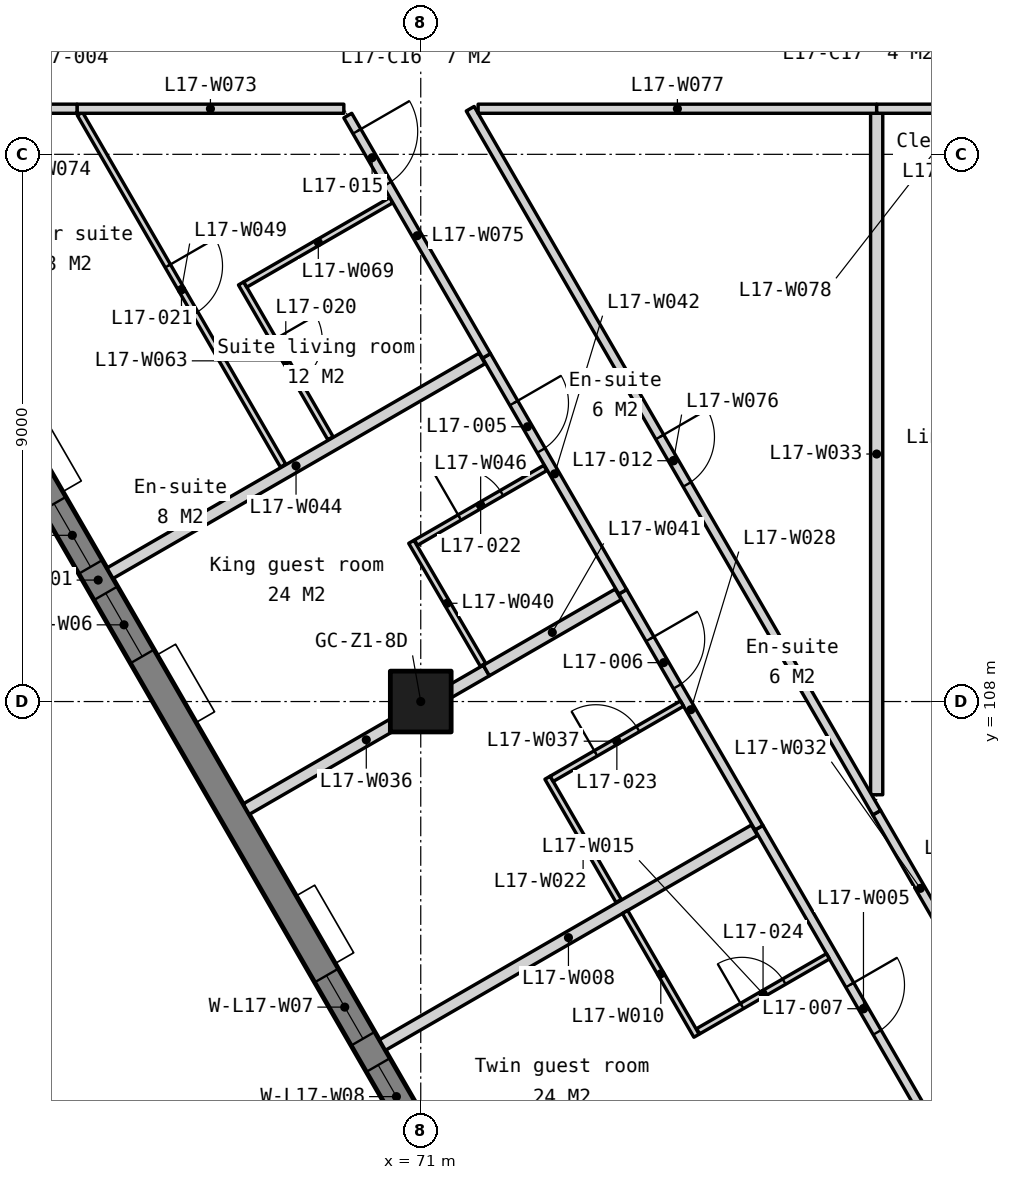
"""IFC4 building model, lengths in metres.
Left out: names, types, materials, properties, quantities, classifications, styles, units other than length and angle.
Written with IfcOpenShell. Run it as: python <this file> out.ifc"""

import sys

from ifc_helpers import new_model, si_unit, direction, frame, frame_2d, origin, origin_2d, place, context, subcontext, project, spatial, polyline, rectangle, outline, extrude, element, fill, save


model = new_model("IFC4")
c1 = context("Model", 3, precision=1e-05, world=origin(), true_north=direction((0.0, 1.0)))
c2 = subcontext(c1, "Body", "Model", "MODEL_VIEW")
j1 = project(units=[si_unit("LENGTHUNIT", "METRE"), si_unit("PLANEANGLEUNIT", "RADIAN")], contexts=[c1])
p1 = place(None, origin())
s1 = spatial("IfcSite", under=j1, at=p1, CompositionType="ELEMENT")
p2 = place(p1, origin())
s2 = spatial("IfcBuilding", under=s1, at=p2, CompositionType="ELEMENT")
p3 = place(p2, frame((0.0, 0.0, 73.5)))
s3 = spatial("IfcBuildingStorey", under=s2, at=p3, CompositionType="ELEMENT", Elevation=73.5)
p4 = place(p3, frame((71.0, 108.0, 0.0), z_axis=(0.0, 0.0, 1.0), x_axis=(1.0, 0.0, 0.0)))
e1 = element("IfcColumn", 1, at=p4, inside=s3, PredefinedType="COLUMN", context=c2, shape_type="SweptSolid", body=[
    extrude(rectangle(XDim=1.0, YDim=1.0, at=origin_2d()), origin(), (0.0, 0.0, 1.0), 3.5),
])
p5 = place(p3, frame((54.495, 129.397, -0.15), z_axis=(0.0, 0.0, 1.0), x_axis=(0.499999201451, -0.866025864826, 0.0)))
e2 = element("IfcWall", 2, at=p5, inside=s3, PredefinedType="SOLIDWALL", context=c2, shape_type="SweptSolid", body=[
    extrude(outline(polyline([(44.8, 0.0), (44.8, 3.4), (0.0, 3.4), (0.0, 0.0), (44.8, 0.0)])), frame((0.0, 0.225, 0.0), z_axis=(0.0, -1.0, 0.0), x_axis=(1.0, 0.0, 0.0)), (0.0, 0.0, 1.0), 0.45),
])
p6 = place(p5, frame((3.03, 0.0, 1.05)))
e3 = element("IfcOpeningElement", 3, at=p6, cuts=e2, PredefinedType="OPENING", context=c2, shape_type="SweptSolid", body=[
    extrude(rectangle(XDim=1.2, YDim=1.5, at=frame_2d((0.6, 0.75))), frame((0.0, 0.235, 0.0), z_axis=(0.0, -1.0, 0.0), x_axis=(1.0, 0.0, 0.0)), (0.0, 0.0, 1.0), 0.47),
])
p7 = place(p5, frame((4.73, 0.0, 1.05)))
e4 = element("IfcOpeningElement", 4, at=p7, cuts=e2, PredefinedType="OPENING", context=c2, shape_type="SweptSolid", body=[
    extrude(rectangle(XDim=1.2, YDim=1.5, at=frame_2d((0.6, 0.75))), frame((0.0, 0.235, 0.0), z_axis=(0.0, -1.0, 0.0), x_axis=(1.0, 0.0, 0.0)), (0.0, 0.0, 1.0), 0.47),
])
p8 = place(p5, frame((11.99, 0.0, 1.05)))
e5 = element("IfcOpeningElement", 5, at=p8, cuts=e2, PredefinedType="OPENING", context=c2, shape_type="SweptSolid", body=[
    extrude(rectangle(XDim=1.2, YDim=1.5, at=frame_2d((0.6, 0.75))), frame((0.0, 0.235, 0.0), z_axis=(0.0, -1.0, 0.0), x_axis=(1.0, 0.0, 0.0)), (0.0, 0.0, 1.0), 0.47),
])
p9 = place(p5, frame((13.69, 0.0, 1.05)))
e6 = element("IfcOpeningElement", 6, at=p9, cuts=e2, PredefinedType="OPENING", context=c2, shape_type="SweptSolid", body=[
    extrude(rectangle(XDim=1.2, YDim=1.5, at=frame_2d((0.6, 0.75))), frame((0.0, 0.235, 0.0), z_axis=(0.0, -1.0, 0.0), x_axis=(1.0, 0.0, 0.0)), (0.0, 0.0, 1.0), 0.47),
])
p10 = place(p5, frame((20.95, 0.0, 1.05)))
e7 = element("IfcOpeningElement", 7, at=p10, cuts=e2, PredefinedType="OPENING", context=c2, shape_type="SweptSolid", body=[
    extrude(rectangle(XDim=1.2, YDim=1.5, at=frame_2d((0.6, 0.75))), frame((0.0, 0.235, 0.0), z_axis=(0.0, -1.0, 0.0), x_axis=(1.0, 0.0, 0.0)), (0.0, 0.0, 1.0), 0.47),
])
p11 = place(p5, frame((22.65, 0.0, 1.05)))
e8 = element("IfcOpeningElement", 8, at=p11, cuts=e2, PredefinedType="OPENING", context=c2, shape_type="SweptSolid", body=[
    extrude(rectangle(XDim=1.2, YDim=1.5, at=frame_2d((0.6, 0.75))), frame((0.0, 0.235, 0.0), z_axis=(0.0, -1.0, 0.0), x_axis=(1.0, 0.0, 0.0)), (0.0, 0.0, 1.0), 0.47),
])
p12 = place(p5, frame((29.91, 0.0, 1.05)))
e9 = element("IfcOpeningElement", 9, at=p12, cuts=e2, PredefinedType="OPENING", context=c2, shape_type="SweptSolid", body=[
    extrude(rectangle(XDim=1.2, YDim=1.5, at=frame_2d((0.6, 0.75))), frame((0.0, 0.235, 0.0), z_axis=(0.0, -1.0, 0.0), x_axis=(1.0, 0.0, 0.0)), (0.0, 0.0, 1.0), 0.47),
])
p13 = place(p5, frame((31.61, 0.0, 1.05)))
e10 = element("IfcOpeningElement", 10, at=p13, cuts=e2, PredefinedType="OPENING", context=c2, shape_type="SweptSolid", body=[
    extrude(rectangle(XDim=1.2, YDim=1.5, at=frame_2d((0.6, 0.75))), frame((0.0, 0.235, 0.0), z_axis=(0.0, -1.0, 0.0), x_axis=(1.0, 0.0, 0.0)), (0.0, 0.0, 1.0), 0.47),
])
p14 = place(p5, frame((38.87, 0.0, 1.05)))
e11 = element("IfcOpeningElement", 11, at=p14, cuts=e2, PredefinedType="OPENING", context=c2, shape_type="SweptSolid", body=[
    extrude(rectangle(XDim=1.2, YDim=1.5, at=frame_2d((0.6, 0.75))), frame((0.0, 0.235, 0.0), z_axis=(0.0, -1.0, 0.0), x_axis=(1.0, 0.0, 0.0)), (0.0, 0.0, 1.0), 0.47),
])
p15 = place(p5, frame((40.57, 0.0, 1.05)))
e12 = element("IfcOpeningElement", 12, at=p15, cuts=e2, PredefinedType="OPENING", context=c2, shape_type="SweptSolid", body=[
    extrude(rectangle(XDim=1.2, YDim=1.5, at=frame_2d((0.6, 0.75))), frame((0.0, 0.235, 0.0), z_axis=(0.0, -1.0, 0.0), x_axis=(1.0, 0.0, 0.0)), (0.0, 0.0, 1.0), 0.47),
])
p16 = place(p3, frame((76.562, 105.926, 0.0), z_axis=(0.0, 0.0, 1.0), x_axis=(0.499991875518, -0.866030094405, 0.0)))
e13 = element("IfcWall", 13, at=p16, inside=s3, PredefinedType="PARTITIONING", context=c2, shape_type="SweptSolid", body=[
    extrude(rectangle(XDim=6.876, YDim=0.15, at=frame_2d((3.438, 0.0))), origin(), (0.0, 0.0, 1.0), 3.25),
])
p17 = place(p16, frame((2.988, 0.0, 0.0)))
e14 = element("IfcOpeningElement", 14, at=p17, cuts=e13, PredefinedType="OPENING", context=c2, shape_type="SweptSolid", body=[
    extrude(rectangle(XDim=0.9, YDim=2.1, at=frame_2d((0.45, 1.05))), frame((0.0, 0.085, 0.0), z_axis=(0.0, -1.0, 0.0), x_axis=(1.0, 0.0, 0.0)), (0.0, 0.0, 1.0), 0.17),
])
p18 = place(p3, frame((70.37, 102.351, 0.0), z_axis=(0.0, 0.0, 1.0), x_axis=(0.866033669941, 0.499985682323, 0.0)))
e15 = element("IfcWall", 15, at=p18, inside=s3, PredefinedType="PARTITIONING", context=c2, shape_type="SweptSolid", body=[
    extrude(rectangle(XDim=7.065, YDim=0.2, at=frame_2d((3.533, 0.0))), origin(), (0.0, 0.0, 1.0), 3.25),
])
p19 = place(p3, frame((74.36, 104.539, 0.0), z_axis=(0.0, 0.0, 1.0), x_axis=(0.500016218704, -0.866016039709, 0.0)))
e16 = element("IfcWall", 16, at=p19, inside=s3, PredefinedType="PARTITIONING", context=c2, shape_type="SweptSolid", body=[
    extrude(rectangle(XDim=2.35, YDim=0.1, at=frame_2d((1.175, 0.0))), origin(), (0.0, 0.0, 1.0), 3.25),
])
p20 = place(p3, frame((75.562, 102.577, 0.0), z_axis=(0.0, 0.0, 1.0), x_axis=(0.865997559407, 0.500048224776, 0.0)))
e17 = element("IfcWall", 17, at=p20, inside=s3, PredefinedType="PARTITIONING", context=c2, shape_type="SweptSolid", body=[
    extrude(rectangle(XDim=2.465, YDim=0.1, at=frame_2d((1.232, 0.0))), origin(), (0.0, 0.0, 1.0), 3.25),
])
p21 = place(p20, frame((0.833, 0.0, 0.0)))
e18 = element("IfcOpeningElement", 18, at=p21, cuts=e17, PredefinedType="OPENING", context=c2, shape_type="SweptSolid", body=[
    extrude(rectangle(XDim=0.8, YDim=2.1, at=frame_2d((0.4, 1.05))), frame((0.0, 0.06, 0.0), z_axis=(0.0, -1.0, 0.0), x_axis=(1.0, 0.0, 0.0)), (0.0, 0.0, 1.0), 0.12),
])
p22 = place(p3, frame((73.085, 106.748, 0.0), z_axis=(0.0, 0.0, 1.0), x_axis=(0.499954256575, -0.866051812152, 0.0)))
e19 = element("IfcWall", 19, at=p22, inside=s3, PredefinedType="PARTITIONING", context=c2, shape_type="SweptSolid", body=[
    extrude(rectangle(XDim=2.34, YDim=0.1, at=frame_2d((1.17, 0.0))), origin(), (0.0, 0.0, 1.0), 3.25),
])
p23 = place(p3, frame((74.322, 109.805, 0.0), z_axis=(0.0, 0.0, 1.0), x_axis=(0.500013360201, -0.866017690131, 0.0)))
e20 = element("IfcWall", 20, at=p23, inside=s3, PredefinedType="PARTITIONING", context=c2, shape_type="SweptSolid", body=[
    extrude(rectangle(XDim=4.48, YDim=0.15, at=frame_2d((2.24, 0.0))), origin(), (0.0, 0.0, 1.0), 3.25),
])
p24 = place(p23, frame((0.896, 0.0, 0.0)))
e21 = element("IfcOpeningElement", 21, at=p24, cuts=e20, PredefinedType="OPENING", context=c2, shape_type="SweptSolid", body=[
    extrude(rectangle(XDim=0.9, YDim=2.1, at=frame_2d((0.45, 1.05))), frame((0.0, 0.085, 0.0), z_axis=(0.0, -1.0, 0.0), x_axis=(1.0, 0.0, 0.0)), (0.0, 0.0, 1.0), 0.17),
])
p25 = place(p3, frame((78.498, 106.172, 0.0), z_axis=(0.0, 0.0, 1.0), x_axis=(0.499994521305, -0.866028566888, 0.0)))
e22 = element("IfcWall", 22, at=p25, inside=s3, PredefinedType="PARTITIONING", context=c2, shape_type="SweptSolid", body=[
    extrude(rectangle(XDim=2.874, YDim=0.15, at=frame_2d((1.437, 0.0))), origin(), (0.0, 0.0, 1.0), 3.25),
])
p26 = place(p3, frame((78.498, 106.467, 0.0), z_axis=(0.0, 0.0, 1.0), x_axis=(0.0, 1.0, 0.0)))
e23 = element("IfcWall", 23, at=p26, inside=s3, PredefinedType="PARTITIONING", context=c2, shape_type="SweptSolid", body=[
    extrude(rectangle(XDim=11.208, YDim=0.2, at=frame_2d((5.604, 0.0))), origin(), (0.0, 0.0, 1.0), 3.25),
])
p27 = place(p3, frame((68.13, 106.23, 0.0), z_axis=(0.0, 0.0, 1.0), x_axis=(0.866030456496, 0.499991248344, 0.0)))
e24 = element("IfcWall", 24, at=p27, inside=s3, PredefinedType="PARTITIONING", context=c2, shape_type="SweptSolid", body=[
    extrude(rectangle(XDim=4.56, YDim=0.2, at=frame_2d((2.28, 0.0))), origin(), (0.0, 0.0, 1.0), 3.25),
])
p28 = place(p3, frame((73.153, 106.729, 0.0), z_axis=(0.0, 0.0, 1.0), x_axis=(0.866073894602, 0.499916002032, 0.0)))
e25 = element("IfcWall", 25, at=p28, inside=s3, PredefinedType="PARTITIONING", context=c2, shape_type="SweptSolid", body=[
    extrude(rectangle(XDim=2.475, YDim=0.1, at=frame_2d((1.238, 0.0))), origin(), (0.0, 0.0, 1.0), 3.25),
])
p29 = place(p28, frame((0.837, 0.0, 0.0)))
e26 = element("IfcOpeningElement", 26, at=p29, cuts=e25, PredefinedType="OPENING", context=c2, shape_type="SweptSolid", body=[
    extrude(rectangle(XDim=0.8, YDim=2.1, at=frame_2d((0.4, 1.05))), frame((0.0, 0.06, 0.0), z_axis=(0.0, -1.0, 0.0), x_axis=(1.0, 0.0, 0.0)), (0.0, 0.0, 1.0), 0.12),
])
p30 = place(p3, frame((70.845, 110.627, 0.0), z_axis=(0.0, 0.0, 1.0), x_axis=(0.503592070056, -0.863941564561, 0.0)))
e27 = element("IfcWall", 27, at=p30, inside=s3, PredefinedType="PARTITIONING", context=c2, shape_type="SweptSolid", body=[
    extrude(rectangle(XDim=2.34, YDim=0.1, at=frame_2d((1.17, 0.0))), origin(), (0.0, 0.0, 1.0), 3.25),
])
p31 = place(p3, frame((72.079, 108.51, 0.0), z_axis=(0.0, 0.0, 1.0), x_axis=(0.866039519639, 0.499975549825, 0.0)))
e28 = element("IfcWall", 28, at=p31, inside=s3, PredefinedType="PARTITIONING", context=c2, shape_type="SweptSolid", body=[
    extrude(rectangle(XDim=2.505, YDim=0.2, at=frame_2d((1.252, 0.0))), origin(), (0.0, 0.0, 1.0), 3.25),
])
p32 = place(p3, frame((72.082, 113.685, 0.0), z_axis=(0.0, 0.0, 1.0), x_axis=(0.499989762656, -0.866031314237, 0.0)))
e29 = element("IfcWall", 29, at=p32, inside=s3, PredefinedType="PARTITIONING", context=c2, shape_type="SweptSolid", body=[
    extrude(rectangle(XDim=4.48, YDim=0.15, at=frame_2d((2.24, 0.0))), origin(), (0.0, 0.0, 1.0), 3.25),
])
p33 = place(p32, frame((0.896, 0.0, 0.0)))
e30 = element("IfcOpeningElement", 30, at=p33, cuts=e29, PredefinedType="OPENING", context=c2, shape_type="SweptSolid", body=[
    extrude(rectangle(XDim=0.9, YDim=2.1, at=frame_2d((0.45, 1.05))), frame((0.0, 0.085, 0.0), z_axis=(0.0, -1.0, 0.0), x_axis=(1.0, 0.0, 0.0)), (0.0, 0.0, 1.0), 0.17),
])
p34 = place(p3, frame((65.89, 110.11, 0.0), z_axis=(0.0, 0.0, 1.0), x_axis=(0.866033669941, 0.499985682323, 0.0)))
e31 = element("IfcWall", 31, at=p34, inside=s3, PredefinedType="PARTITIONING", context=c2, shape_type="SweptSolid", body=[
    extrude(rectangle(XDim=7.065, YDim=0.2, at=frame_2d((3.533, 0.0))), origin(), (0.0, 0.0, 1.0), 3.25),
])
p35 = place(p3, frame((70.922, 110.614, 0.0), z_axis=(0.0, 0.0, 1.0), x_axis=(0.866049783786, 0.499957770222, 0.0)))
e32 = element("IfcWall", 32, at=p35, inside=s3, PredefinedType="PARTITIONING", context=c2, shape_type="SweptSolid", body=[
    extrude(rectangle(XDim=2.455, YDim=0.1, at=frame_2d((1.228, 0.0))), origin(), (0.0, 0.0, 1.0), 3.25),
])
p36 = place(p35, frame((0.827, 0.0, 0.0)))
e33 = element("IfcOpeningElement", 33, at=p36, cuts=e32, PredefinedType="OPENING", context=c2, shape_type="SweptSolid", body=[
    extrude(rectangle(XDim=0.8, YDim=2.1, at=frame_2d((0.4, 1.05))), frame((0.0, 0.06, 0.0), z_axis=(0.0, -1.0, 0.0), x_axis=(1.0, 0.0, 0.0)), (0.0, 0.0, 1.0), 0.12),
])
p37 = place(p3, frame((65.395, 117.668, 0.0), z_axis=(0.0, 0.0, 1.0), x_axis=(0.499986003774, -0.866033484359, 0.0)))
e34 = element("IfcWall", 34, at=p37, inside=s3, PredefinedType="PARTITIONING", context=c2, shape_type="SweptSolid", body=[
    extrude(rectangle(XDim=6.682, YDim=0.1, at=frame_2d((3.341, 0.0))), origin(), (0.0, 0.0, 1.0), 3.25),
])
p38 = place(p37, frame((2.891, 0.0, 0.0)))
e35 = element("IfcOpeningElement", 35, at=p38, cuts=e34, PredefinedType="OPENING", context=c2, shape_type="SweptSolid", body=[
    extrude(rectangle(XDim=0.9, YDim=2.1, at=frame_2d((0.45, 1.05))), frame((0.0, 0.06, 0.0), z_axis=(0.0, -1.0, 0.0), x_axis=(1.0, 0.0, 0.0)), (0.0, 0.0, 1.0), 0.12),
])
p39 = place(p3, frame((68.045, 114.877, 0.0), z_axis=(0.0, 0.0, 1.0), x_axis=(0.499988418424, -0.866032090307, 0.0)))
e36 = element("IfcWall", 36, at=p39, inside=s3, PredefinedType="PARTITIONING", context=c2, shape_type="SweptSolid", body=[
    extrude(rectangle(XDim=2.94, YDim=0.1, at=frame_2d((1.47, 0.0))), origin(), (0.0, 0.0, 1.0), 3.25),
])
p40 = place(p39, frame((1.07, 0.0, 0.0)))
e37 = element("IfcOpeningElement", 37, at=p40, cuts=e36, PredefinedType="OPENING", context=c2, shape_type="SweptSolid", body=[
    extrude(rectangle(XDim=0.8, YDim=2.1, at=frame_2d((0.4, 1.05))), frame((0.0, 0.06, 0.0), z_axis=(0.0, -1.0, 0.0), x_axis=(1.0, 0.0, 0.0)), (0.0, 0.0, 1.0), 0.12),
])
p41 = place(p3, frame((68.114, 114.858, 0.0), z_axis=(0.0, 0.0, 1.0), x_axis=(0.866042014628, 0.499971228071, 0.0)))
e38 = element("IfcWall", 38, at=p41, inside=s3, PredefinedType="PARTITIONING", context=c2, shape_type="SweptSolid", body=[
    extrude(rectangle(XDim=2.775, YDim=0.1, at=frame_2d((1.388, 0.0))), origin(), (0.0, 0.0, 1.0), 3.25),
])
p42 = place(p3, frame((65.347, 117.75, 0.0), z_axis=(0.0, 0.0, 1.0), x_axis=(1.0, 0.0, 0.0)))
e39 = element("IfcWall", 39, at=p42, inside=s3, PredefinedType="PARTITIONING", context=c2, shape_type="SweptSolid", body=[
    extrude(rectangle(XDim=4.388, YDim=0.15, at=frame_2d((2.194, 0.0))), origin(), (0.0, 0.0, 1.0), 3.25),
])
p43 = place(p3, frame((64.275, 117.75, 0.0), z_axis=(0.0, 0.0, 1.0), x_axis=(1.0, 0.0, 0.0)))
e40 = element("IfcWall", 40, at=p43, inside=s3, PredefinedType="PARTITIONING", context=c2, shape_type="SweptSolid", body=[
    extrude(rectangle(XDim=1.072, YDim=0.15, at=frame_2d((0.536, 0.0))), origin(), (0.0, 0.0, 1.0), 3.25),
])
p44 = place(p3, frame((69.8, 117.637, 0.0), z_axis=(0.0, 0.0, 1.0), x_axis=(0.499994135611, -0.866028789565, 0.0)))
e41 = element("IfcWall", 41, at=p44, inside=s3, PredefinedType="PARTITIONING", context=c2, shape_type="SweptSolid", body=[
    extrude(rectangle(XDim=4.563, YDim=0.15, at=frame_2d((2.282, 0.0))), origin(), (0.0, 0.0, 1.0), 3.25),
])
p45 = place(p44, frame((0.3, 0.0, 0.0)))
e42 = element("IfcOpeningElement", 42, at=p45, cuts=e41, PredefinedType="OPENING", context=c2, shape_type="SweptSolid", body=[
    extrude(rectangle(XDim=1.0, YDim=2.1, at=frame_2d((0.5, 1.05))), frame((0.0, 0.085, 0.0), z_axis=(0.0, -1.0, 0.0), x_axis=(1.0, 0.0, 0.0)), (0.0, 0.0, 1.0), 0.17),
])
p46 = place(p3, frame((71.813, 117.75, 0.0), z_axis=(0.0, 0.0, 1.0), x_axis=(0.500004357924, -0.866022887721, 0.0)))
e43 = element("IfcWall", 43, at=p46, inside=s3, PredefinedType="PARTITIONING", context=c2, shape_type="SweptSolid", body=[
    extrude(rectangle(XDim=13.369, YDim=0.15, at=frame_2d((6.685, 0.0))), origin(), (0.0, 0.0, 1.0), 3.25),
])
p47 = place(p46, frame((6.235, 0.0, 0.0)))
e44 = element("IfcOpeningElement", 44, at=p47, cuts=e43, PredefinedType="OPENING", context=c2, shape_type="SweptSolid", body=[
    extrude(rectangle(XDim=0.9, YDim=2.1, at=frame_2d((0.45, 1.05))), frame((0.0, 0.085, 0.0), z_axis=(0.0, -1.0, 0.0), x_axis=(1.0, 0.0, 0.0)), (0.0, 0.0, 1.0), 0.17),
])
p48 = place(p3, frame((71.943, 117.75, 0.0), z_axis=(0.0, 0.0, 1.0), x_axis=(1.0, 0.0, 0.0)))
e45 = element("IfcWall", 45, at=p48, inside=s3, PredefinedType="PARTITIONING", context=c2, shape_type="SweptSolid", body=[
    extrude(rectangle(XDim=6.555, YDim=0.15, at=frame_2d((3.277, 0.0))), origin(), (0.0, 0.0, 1.0), 3.25),
])
p49 = place(p3, frame((78.498, 117.75, 0.0), z_axis=(0.0, 0.0, 1.0), x_axis=(1.0, 0.0, 0.0)))
e46 = element("IfcWall", 46, at=p49, inside=s3, PredefinedType="PARTITIONING", context=c2, shape_type="SweptSolid", body=[
    extrude(rectangle(XDim=3.004, YDim=0.15, at=frame_2d((1.502, 0.0))), origin(), (0.0, 0.0, 1.0), 3.25),
])
p50 = place(p10, origin())
e47 = element("IfcWindow", 47, at=p50, inside=s3, PartitioningType="SINGLE_PANEL", PredefinedType="WINDOW", context=c2, shape_type="SweptSolid", body=[
    extrude(rectangle(XDim=1.2, YDim=1.5, at=frame_2d((0.6, 0.75))), frame((0.0, 0.03, 0.0), z_axis=(0.0, -1.0, 0.0), x_axis=(1.0, 0.0, 0.0)), (0.0, 0.0, 1.0), 0.06),
])
fill(e7, e47)
p51 = place(p11, origin())
e48 = element("IfcWindow", 48, at=p51, inside=s3, PartitioningType="SINGLE_PANEL", PredefinedType="WINDOW", context=c2, shape_type="SweptSolid", body=[
    extrude(rectangle(XDim=1.2, YDim=1.5, at=frame_2d((0.6, 0.75))), frame((0.0, 0.03, 0.0), z_axis=(0.0, -1.0, 0.0), x_axis=(1.0, 0.0, 0.0)), (0.0, 0.0, 1.0), 0.06),
])
fill(e8, e48)
p52 = place(p12, origin())
e49 = element("IfcWindow", 49, at=p52, inside=s3, PartitioningType="SINGLE_PANEL", PredefinedType="WINDOW", context=c2, shape_type="SweptSolid", body=[
    extrude(rectangle(XDim=1.2, YDim=1.5, at=frame_2d((0.6, 0.75))), frame((0.0, 0.03, 0.0), z_axis=(0.0, -1.0, 0.0), x_axis=(1.0, 0.0, 0.0)), (0.0, 0.0, 1.0), 0.06),
])
fill(e9, e49)
p53 = place(p13, origin())
e50 = element("IfcWindow", 50, at=p53, inside=s3, PartitioningType="SINGLE_PANEL", PredefinedType="WINDOW", context=c2, shape_type="SweptSolid", body=[
    extrude(rectangle(XDim=1.2, YDim=1.5, at=frame_2d((0.6, 0.75))), frame((0.0, 0.03, 0.0), z_axis=(0.0, -1.0, 0.0), x_axis=(1.0, 0.0, 0.0)), (0.0, 0.0, 1.0), 0.06),
])
fill(e10, e50)
p54 = place(p33, origin())
e51 = element("IfcDoor", 51, at=p54, inside=s3, OperationType="SINGLE_SWING_LEFT", PredefinedType="DOOR", context=c2, shape_type="SweptSolid", body=[
    extrude(rectangle(XDim=0.9, YDim=2.1, at=frame_2d((0.45, 1.05))), frame((0.0, 0.025, 0.0), z_axis=(0.0, -1.0, 0.0), x_axis=(1.0, 0.0, 0.0)), (0.0, 0.0, 1.0), 0.05),
])
fill(e30, e51)
p55 = place(p24, origin())
e52 = element("IfcDoor", 52, at=p55, inside=s3, OperationType="SINGLE_SWING_LEFT", PredefinedType="DOOR", context=c2, shape_type="SweptSolid", body=[
    extrude(rectangle(XDim=0.9, YDim=2.1, at=frame_2d((0.45, 1.05))), frame((0.0, 0.025, 0.0), z_axis=(0.0, -1.0, 0.0), x_axis=(1.0, 0.0, 0.0)), (0.0, 0.0, 1.0), 0.05),
])
fill(e21, e52)
p56 = place(p17, origin())
e53 = element("IfcDoor", 53, at=p56, inside=s3, OperationType="SINGLE_SWING_LEFT", PredefinedType="DOOR", context=c2, shape_type="SweptSolid", body=[
    extrude(rectangle(XDim=0.9, YDim=2.1, at=frame_2d((0.45, 1.05))), frame((0.0, 0.025, 0.0), z_axis=(0.0, -1.0, 0.0), x_axis=(1.0, 0.0, 0.0)), (0.0, 0.0, 1.0), 0.05),
])
fill(e14, e53)
p57 = place(p47, origin())
e54 = element("IfcDoor", 54, at=p57, inside=s3, OperationType="SINGLE_SWING_LEFT", PredefinedType="DOOR", context=c2, shape_type="SweptSolid", body=[
    extrude(rectangle(XDim=0.9, YDim=2.1, at=frame_2d((0.45, 1.05))), frame((0.0, 0.025, 0.0), z_axis=(0.0, -1.0, 0.0), x_axis=(1.0, 0.0, 0.0)), (0.0, 0.0, 1.0), 0.05),
])
fill(e44, e54)
p58 = place(p45, origin())
e55 = element("IfcDoor", 55, at=p58, inside=s3, OperationType="SINGLE_SWING_LEFT", PredefinedType="DOOR", context=c2, shape_type="SweptSolid", body=[
    extrude(rectangle(XDim=1.0, YDim=2.1, at=frame_2d((0.5, 1.05))), frame((0.0, 0.025, 0.0), z_axis=(0.0, -1.0, 0.0), x_axis=(1.0, 0.0, 0.0)), (0.0, 0.0, 1.0), 0.05),
])
fill(e42, e55)
p59 = place(p40, origin())
e56 = element("IfcDoor", 56, at=p59, inside=s3, OperationType="SINGLE_SWING_LEFT", PredefinedType="DOOR", context=c2, shape_type="SweptSolid", body=[
    extrude(rectangle(XDim=0.8, YDim=2.1, at=frame_2d((0.4, 1.05))), frame((0.0, 0.025, 0.0), z_axis=(0.0, -1.0, 0.0), x_axis=(1.0, 0.0, 0.0)), (0.0, 0.0, 1.0), 0.05),
])
fill(e37, e56)
p60 = place(p38, origin())
e57 = element("IfcDoor", 57, at=p60, inside=s3, OperationType="SINGLE_SWING_LEFT", PredefinedType="DOOR", context=c2, shape_type="SweptSolid", body=[
    extrude(rectangle(XDim=0.9, YDim=2.1, at=frame_2d((0.45, 1.05))), frame((0.0, 0.025, 0.0), z_axis=(0.0, -1.0, 0.0), x_axis=(1.0, 0.0, 0.0)), (0.0, 0.0, 1.0), 0.05),
])
fill(e35, e57)
p61 = place(p36, origin())
e58 = element("IfcDoor", 58, at=p61, inside=s3, OperationType="SINGLE_SWING_LEFT", PredefinedType="DOOR", context=c2, shape_type="SweptSolid", body=[
    extrude(rectangle(XDim=0.8, YDim=2.1, at=frame_2d((0.4, 1.05))), frame((0.0, 0.025, 0.0), z_axis=(0.0, -1.0, 0.0), x_axis=(1.0, 0.0, 0.0)), (0.0, 0.0, 1.0), 0.05),
])
fill(e33, e58)
p62 = place(p29, origin())
e59 = element("IfcDoor", 59, at=p62, inside=s3, OperationType="SINGLE_SWING_LEFT", PredefinedType="DOOR", context=c2, shape_type="SweptSolid", body=[
    extrude(rectangle(XDim=0.8, YDim=2.1, at=frame_2d((0.4, 1.05))), frame((0.0, 0.025, 0.0), z_axis=(0.0, -1.0, 0.0), x_axis=(1.0, 0.0, 0.0)), (0.0, 0.0, 1.0), 0.05),
])
fill(e26, e59)
p63 = place(p21, origin())
e60 = element("IfcDoor", 60, at=p63, inside=s3, OperationType="SINGLE_SWING_LEFT", PredefinedType="DOOR", context=c2, shape_type="SweptSolid", body=[
    extrude(rectangle(XDim=0.8, YDim=2.1, at=frame_2d((0.4, 1.05))), frame((0.0, 0.025, 0.0), z_axis=(0.0, -1.0, 0.0), x_axis=(1.0, 0.0, 0.0)), (0.0, 0.0, 1.0), 0.05),
])
fill(e18, e60)
save(model, sys.argv[1])
